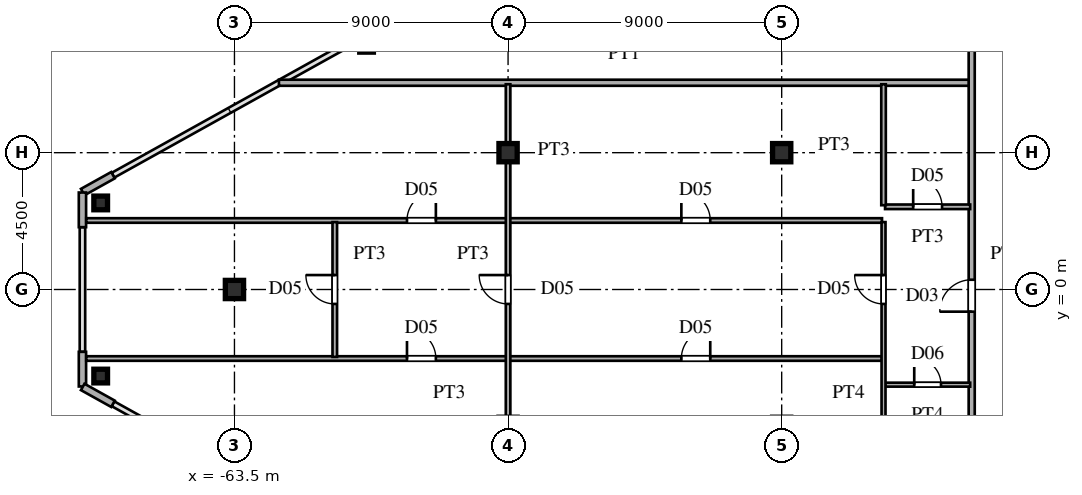
"""IFC4 building model, lengths in metres.
Left out: names, types, materials, properties, quantities, classifications, styles, units other than length and angle.
Written with IfcOpenShell. Run it as: python <this file> out.ifc"""

import sys

from ifc_helpers import new_model, si_unit, direction, frame, frame_2d, origin, origin_2d, place, context, subcontext, project, spatial, rectangle, hollow_rectangle, i_section, extrude, source, transform, mapped, element, fill, save


model = new_model("IFC4")
c1 = context("Model", 3, precision=1e-05, world=origin(), true_north=direction((0.0, 1.0)))
c2 = subcontext(c1, "Body", "Model", "MODEL_VIEW")
j1 = project(units=[si_unit("LENGTHUNIT", "METRE"), si_unit("PLANEANGLEUNIT", "RADIAN")], contexts=[c1])
p1 = place(None, origin())
s1 = spatial("IfcSite", under=j1, at=p1, CompositionType="ELEMENT")
p2 = place(p1, origin())
s2 = spatial("IfcBuilding", under=s1, at=p2, CompositionType="ELEMENT")
p3 = place(p2, frame((0.0, 0.0, 188.7)))
s3 = spatial("IfcBuildingStorey", under=s2, at=p3, CompositionType="ELEMENT", Elevation=188.7)
m1 = source(origin(), c2, "Body", "SweptSolid", [
    extrude(i_section(OverallWidth=0.6, OverallDepth=0.6, WebThickness=0.025, FlangeThickness=0.04, at=origin_2d()), origin(), (0.0, 0.0, 1.0), 3.6),
])
for number, where, z_axis, x_axis in (
    (1, (-45.5, 4.5, 0.0), (0.0, 0.0, 1.0), (1.0, 0.0, 0.0)),
    (2, (-54.5, 4.5, 0.0), (0.0, 0.0, 1.0), (1.0, 0.0, 0.0)),
    (3, (-63.5, 0.0, 0.0), (0.0, 0.0, 1.0), (1.0, 0.0, 0.0)),
):
    element("IfcColumn", number, at=place(p3, frame(where, z_axis=z_axis, x_axis=x_axis)), inside=s3, PredefinedType="COLUMN", context=c2, shape_type="MappedRepresentation", body=[
        mapped(m1, transform((0.0, 0.0, 0.0), scale=1.0)),
    ])
m2 = source(origin(), c2, "Body", "SweptSolid", [
    extrude(hollow_rectangle(XDim=0.45, YDim=0.45, WallThickness=0.018, at=origin_2d()), origin(), (0.0, 0.0, 1.0), 3.6),
])
for number, where, z_axis, x_axis in (
    (4, (-67.9, 2.847, 0.0), (0.0, 0.0, 1.0), (1.0, 0.0, 0.0)),
    (5, (-67.9, -2.847, 0.0), (0.0, 0.0, 1.0), (1.0, 0.0, 0.0)),
):
    element("IfcColumn", number, at=place(p3, frame(where, z_axis=z_axis, x_axis=x_axis)), inside=s3, PredefinedType="COLUMN", context=c2, shape_type="MappedRepresentation", body=[
        mapped(m2, transform((0.0, 0.0, 0.0), scale=1.0)),
    ])
for number, where, z_axis, x_axis in (
    (6, (-67.495, 3.759, 0.0), (0.0, 0.0, 1.0), (-0.874, -0.486, 0.0)),
    (7, (-68.5, 3.19, 0.0), (0.0, 0.0, 1.0), (0.0, -1.0, 0.0)),
    (8, (-68.5, -2.05, 0.0), (0.0, 0.0, 1.0), (0.0, -1.0, 0.0)),
    (9, (-68.491, -3.205, 0.0), (0.0, 0.0, 1.0), (0.874, -0.486, 0.0)),
):
    element("IfcWall", number, at=place(p3, frame(where, z_axis=z_axis, x_axis=x_axis)), inside=s3, PredefinedType="SOLIDWALL", context=c2, shape_type="SweptSolid", body=[
        extrude(rectangle(XDim=1.14, YDim=0.24, at=frame_2d((0.57, 0.0))), origin(), (0.0, 0.0, 1.0), 3.38),
    ])
p4 = place(p3, frame((-42.1, -3.13, 0.0), z_axis=(0.0, 0.0, 1.0), x_axis=(1.0, 0.0, 0.0)))
e10 = element("IfcWall", 10, at=p4, inside=s3, PredefinedType="PARTITIONING", context=c2, shape_type="SweptSolid", body=[
    extrude(rectangle(XDim=2.8, YDim=0.13, at=frame_2d((1.4, 0.0))), origin(), (0.0, 0.0, 1.0), 3.38),
])
p5 = place(p4, frame((0.96, 0.0, 0.0)))
e11 = element("IfcOpeningElement", 11, at=p5, cuts=e10, PredefinedType="OPENING", context=c2, shape_type="SweptSolid", body=[
    extrude(rectangle(XDim=0.88, YDim=2.1, at=frame_2d((0.44, 1.05))), frame((0.0, 0.075, 0.0), z_axis=(0.0, -1.0, 0.0), x_axis=(1.0, 0.0, 0.0)), (0.0, 0.0, 1.0), 0.15),
])
p6 = place(p3, frame((-68.375, -2.27, 0.0), z_axis=(0.0, 0.0, 1.0), x_axis=(1.0, 0.0, 0.0)))
e12 = element("IfcWall", 12, at=p6, inside=s3, PredefinedType="PARTITIONING", context=c2, shape_type="SweptSolid", body=[
    extrude(rectangle(XDim=26.175, YDim=0.15, at=frame_2d((13.087, 0.0))), origin(), (0.0, 0.0, 1.0), 3.38),
])
p7 = place(p6, frame((19.575, 0.0, 0.0)))
e13 = element("IfcOpeningElement", 13, at=p7, cuts=e12, PredefinedType="OPENING", context=c2, shape_type="SweptSolid", body=[
    extrude(rectangle(XDim=0.95, YDim=2.15, at=frame_2d((0.475, 1.075))), frame((0.0, 0.085, 0.0), z_axis=(0.0, -1.0, 0.0), x_axis=(1.0, 0.0, 0.0)), (0.0, 0.0, 1.0), 0.17),
])
p8 = place(p6, frame((10.55, 0.0, 0.0)))
e14 = element("IfcOpeningElement", 14, at=p8, cuts=e12, PredefinedType="OPENING", context=c2, shape_type="SweptSolid", body=[
    extrude(rectangle(XDim=0.95, YDim=2.15, at=frame_2d((0.475, 1.075))), frame((0.0, 0.085, 0.0), z_axis=(0.0, -1.0, 0.0), x_axis=(1.0, 0.0, 0.0)), (0.0, 0.0, 1.0), 0.17),
])
p9 = place(p3, frame((-68.375, 2.27, 0.0), z_axis=(0.0, 0.0, 1.0), x_axis=(1.0, 0.0, 0.0)))
e15 = element("IfcWall", 15, at=p9, inside=s3, PredefinedType="PARTITIONING", context=c2, shape_type="SweptSolid", body=[
    extrude(rectangle(XDim=26.175, YDim=0.15, at=frame_2d((13.087, 0.0))), origin(), (0.0, 0.0, 1.0), 3.38),
])
p10 = place(p9, frame((19.575, 0.0, 0.0)))
e16 = element("IfcOpeningElement", 16, at=p10, cuts=e15, PredefinedType="OPENING", context=c2, shape_type="SweptSolid", body=[
    extrude(rectangle(XDim=0.95, YDim=2.15, at=frame_2d((0.475, 1.075))), frame((0.0, 0.085, 0.0), z_axis=(0.0, -1.0, 0.0), x_axis=(1.0, 0.0, 0.0)), (0.0, 0.0, 1.0), 0.17),
])
p11 = place(p9, frame((10.55, 0.0, 0.0)))
e17 = element("IfcOpeningElement", 17, at=p11, cuts=e15, PredefinedType="OPENING", context=c2, shape_type="SweptSolid", body=[
    extrude(rectangle(XDim=0.95, YDim=2.15, at=frame_2d((0.475, 1.075))), frame((0.0, 0.085, 0.0), z_axis=(0.0, -1.0, 0.0), x_axis=(1.0, 0.0, 0.0)), (0.0, 0.0, 1.0), 0.17),
])
p12 = place(p3, frame((-42.1, 2.72, 0.0), z_axis=(0.0, 0.0, 1.0), x_axis=(1.0, 0.0, 0.0)))
e18 = element("IfcWall", 18, at=p12, inside=s3, PredefinedType="PARTITIONING", context=c2, shape_type="SweptSolid", body=[
    extrude(rectangle(XDim=2.8, YDim=0.15, at=frame_2d((1.4, 0.0))), origin(), (0.0, 0.0, 1.0), 3.38),
])
p13 = place(p12, frame((0.925, 0.0, 0.0)))
e19 = element("IfcOpeningElement", 19, at=p13, cuts=e18, PredefinedType="OPENING", context=c2, shape_type="SweptSolid", body=[
    extrude(rectangle(XDim=0.95, YDim=2.15, at=frame_2d((0.475, 1.075))), frame((0.0, 0.085, 0.0), z_axis=(0.0, -1.0, 0.0), x_axis=(1.0, 0.0, 0.0)), (0.0, 0.0, 1.0), 0.17),
])
p14 = place(p3, frame((-62.037, 6.8, 0.0), z_axis=(0.0, 0.0, 1.0), x_axis=(1.0, 0.0, 0.0)))
e20 = element("IfcWall", 20, at=p14, inside=s3, PredefinedType="PARTITIONING", context=c2, shape_type="SweptSolid", body=[
    extrude(rectangle(XDim=22.707, YDim=0.2, at=frame_2d((11.354, 0.0))), origin(), (0.0, 0.0, 1.0), 3.38),
])
p15 = place(p3, frame((-60.2, -2.217, 0.0), z_axis=(0.0, 0.0, 1.0), x_axis=(0.0, 1.0, 0.0)))
e21 = element("IfcWall", 21, at=p15, inside=s3, PredefinedType="PARTITIONING", context=c2, shape_type="SweptSolid", body=[
    extrude(rectangle(XDim=4.434, YDim=0.15, at=frame_2d((2.217, 0.0))), origin(), (0.0, 0.0, 1.0), 3.38),
])
p16 = place(p15, frame((1.742, 0.0, 0.0)))
e22 = element("IfcOpeningElement", 22, at=p16, cuts=e21, PredefinedType="OPENING", context=c2, shape_type="SweptSolid", body=[
    extrude(rectangle(XDim=0.95, YDim=2.15, at=frame_2d((0.475, 1.075))), frame((0.0, 0.085, 0.0), z_axis=(0.0, -1.0, 0.0), x_axis=(1.0, 0.0, 0.0)), (0.0, 0.0, 1.0), 0.17),
])
p17 = place(p3, frame((-54.5, -6.75, 0.0), z_axis=(0.0, 0.0, 1.0), x_axis=(0.0, 1.0, 0.0)))
e23 = element("IfcWall", 23, at=p17, inside=s3, PredefinedType="PARTITIONING", context=c2, shape_type="SweptSolid", body=[
    extrude(rectangle(XDim=13.5, YDim=0.15, at=frame_2d((6.75, 0.0))), origin(), (0.0, 0.0, 1.0), 2.78),
])
p18 = place(p17, frame((6.275, 0.0, 0.0)))
e24 = element("IfcOpeningElement", 24, at=p18, cuts=e23, PredefinedType="OPENING", context=c2, shape_type="SweptSolid", body=[
    extrude(rectangle(XDim=0.95, YDim=2.15, at=frame_2d((0.475, 1.075))), frame((0.0, 0.085, 0.0), z_axis=(0.0, -1.0, 0.0), x_axis=(1.0, 0.0, 0.0)), (0.0, 0.0, 1.0), 0.17),
])
p19 = place(p3, frame((-42.15, -6.75, 0.0), z_axis=(0.0, 0.0, 1.0), x_axis=(0.0, 1.0, 0.0)))
e25 = element("IfcWall", 25, at=p19, inside=s3, PredefinedType="PARTITIONING", context=c2, shape_type="SweptSolid", body=[
    extrude(rectangle(XDim=8.967, YDim=0.13, at=frame_2d((4.483, 0.0))), origin(), (0.0, 0.0, 1.0), 3.38),
])
p20 = place(p19, frame((6.275, 0.0, 0.0)))
e26 = element("IfcOpeningElement", 26, at=p20, cuts=e25, PredefinedType="OPENING", context=c2, shape_type="SweptSolid", body=[
    extrude(rectangle(XDim=0.95, YDim=2.15, at=frame_2d((0.475, 1.075))), frame((0.0, 0.075, 0.0), z_axis=(0.0, -1.0, 0.0), x_axis=(1.0, 0.0, 0.0)), (0.0, 0.0, 1.0), 0.15),
])
p21 = place(p3, frame((-42.15, 2.772, 0.0), z_axis=(0.0, 0.0, 1.0), x_axis=(0.0, 1.0, 0.0)))
e27 = element("IfcWall", 27, at=p21, inside=s3, PredefinedType="PARTITIONING", context=c2, shape_type="SweptSolid", body=[
    extrude(rectangle(XDim=3.978, YDim=0.15, at=frame_2d((1.989, 0.0))), origin(), (0.0, 0.0, 1.0), 3.38),
])
p22 = place(p3, frame((-39.25, -15.715, 0.0), z_axis=(0.0, 0.0, 1.0), x_axis=(0.0, 1.0, 0.0)))
e28 = element("IfcWall", 28, at=p22, inside=s3, PredefinedType="PARTITIONING", context=c2, shape_type="SweptSolid", body=[
    extrude(rectangle(XDim=31.43, YDim=0.2, at=frame_2d((15.715, 0.0))), origin(), (0.0, 0.0, 1.0), 3.38),
])
p23 = place(p22, frame((3.89, 0.0, 0.0)))
e29 = element("IfcOpeningElement", 29, at=p23, cuts=e28, PredefinedType="OPENING", context=c2, shape_type="SweptSolid", body=[
    extrude(rectangle(XDim=1.05, YDim=2.25, at=frame_2d((0.525, 1.125))), frame((0.0, 0.11, 0.0), z_axis=(0.0, -1.0, 0.0), x_axis=(1.0, 0.0, 0.0)), (0.0, 0.0, 1.0), 0.22),
])
p24 = place(p22, frame((14.986, 0.0, 0.0)))
e30 = element("IfcOpeningElement", 30, at=p24, cuts=e28, PredefinedType="OPENING", context=c2, shape_type="SweptSolid", body=[
    extrude(rectangle(XDim=1.05, YDim=2.25, at=frame_2d((0.525, 1.125))), frame((0.0, 0.11, 0.0), z_axis=(0.0, -1.0, 0.0), x_axis=(1.0, 0.0, 0.0)), (0.0, 0.0, 1.0), 0.22),
])
p25 = place(p22, frame((26.49, 0.0, 0.0)))
e31 = element("IfcOpeningElement", 31, at=p25, cuts=e28, PredefinedType="OPENING", context=c2, shape_type="SweptSolid", body=[
    extrude(rectangle(XDim=1.05, YDim=2.25, at=frame_2d((0.525, 1.125))), frame((0.0, 0.11, 0.0), z_axis=(0.0, -1.0, 0.0), x_axis=(1.0, 0.0, 0.0)), (0.0, 0.0, 1.0), 0.22),
])
m3 = source(origin(), c2, "Body", "SweptSolid", [
    extrude(rectangle(XDim=0.88, YDim=2.1, at=frame_2d((0.44, 1.05))), frame((0.0, 0.025, 0.0), z_axis=(0.0, -1.0, 0.0), x_axis=(1.0, 0.0, 0.0)), (0.0, 0.0, 1.0), 0.05),
])
p26 = place(p5, origin())
e32 = element("IfcDoor", 32, at=p26, inside=s3, OperationType="SINGLE_SWING_LEFT", PredefinedType="DOOR", context=c2, shape_type="MappedRepresentation", body=[
    mapped(m3, transform((0.0, 0.0, 0.0), scale=1.0)),
])
fill(e11, e32)
m4 = source(origin(), c2, "Body", "SweptSolid", [
    extrude(rectangle(XDim=0.95, YDim=2.15, at=frame_2d((0.475, 1.075))), frame((0.0, 0.025, 0.0), z_axis=(0.0, -1.0, 0.0), x_axis=(1.0, 0.0, 0.0)), (0.0, 0.0, 1.0), 0.05),
])
p27 = place(p7, origin())
e33 = element("IfcDoor", 33, at=p27, inside=s3, OperationType="SINGLE_SWING_RIGHT", PredefinedType="DOOR", context=c2, shape_type="MappedRepresentation", body=[
    mapped(m4, transform((0.0, 0.0, 0.0), scale=1.0)),
])
fill(e13, e33)
p28 = place(p8, origin())
e34 = element("IfcDoor", 34, at=p28, inside=s3, OperationType="SINGLE_SWING_LEFT", PredefinedType="DOOR", context=c2, shape_type="MappedRepresentation", body=[
    mapped(m4, transform((0.0, 0.0, 0.0), scale=1.0)),
])
fill(e14, e34)
p29 = place(p10, origin())
e35 = element("IfcDoor", 35, at=p29, inside=s3, OperationType="SINGLE_SWING_LEFT", PredefinedType="DOOR", context=c2, shape_type="MappedRepresentation", body=[
    mapped(m4, transform((0.0, 0.0, 0.0), scale=1.0)),
])
fill(e16, e35)
p30 = place(p11, origin())
e36 = element("IfcDoor", 36, at=p30, inside=s3, OperationType="SINGLE_SWING_RIGHT", PredefinedType="DOOR", context=c2, shape_type="MappedRepresentation", body=[
    mapped(m4, transform((0.0, 0.0, 0.0), scale=1.0)),
])
fill(e17, e36)
p31 = place(p13, origin())
e37 = element("IfcDoor", 37, at=p31, inside=s3, OperationType="SINGLE_SWING_LEFT", PredefinedType="DOOR", context=c2, shape_type="MappedRepresentation", body=[
    mapped(m4, transform((0.0, 0.0, 0.0), scale=1.0)),
])
fill(e19, e37)
p32 = place(p16, origin())
e38 = element("IfcDoor", 38, at=p32, inside=s3, OperationType="SINGLE_SWING_RIGHT", PredefinedType="DOOR", context=c2, shape_type="MappedRepresentation", body=[
    mapped(m4, transform((0.0, 0.0, 0.0), scale=1.0)),
])
fill(e22, e38)
p33 = place(p18, origin())
e39 = element("IfcDoor", 39, at=p33, inside=s3, OperationType="SINGLE_SWING_RIGHT", PredefinedType="DOOR", context=c2, shape_type="MappedRepresentation", body=[
    mapped(m4, transform((0.0, 0.0, 0.0), scale=1.0)),
])
fill(e24, e39)
p34 = place(p20, origin())
e40 = element("IfcDoor", 40, at=p34, inside=s3, OperationType="SINGLE_SWING_RIGHT", PredefinedType="DOOR", context=c2, shape_type="MappedRepresentation", body=[
    mapped(m4, transform((0.0, 0.0, 0.0), scale=1.0)),
])
fill(e26, e40)
m5 = source(origin(), c2, "Body", "SweptSolid", [
    extrude(rectangle(XDim=1.05, YDim=2.25, at=frame_2d((0.525, 1.125))), frame((0.0, 0.025, 0.0), z_axis=(0.0, -1.0, 0.0), x_axis=(1.0, 0.0, 0.0)), (0.0, 0.0, 1.0), 0.05),
])
p35 = place(p24, origin())
e41 = element("IfcDoor", 41, at=p35, inside=s3, OperationType="SINGLE_SWING_LEFT", PredefinedType="DOOR", context=c2, shape_type="MappedRepresentation", body=[
    mapped(m5, transform((0.0, 0.0, 0.0), scale=1.0)),
])
fill(e30, e41)
save(model, sys.argv[1])
